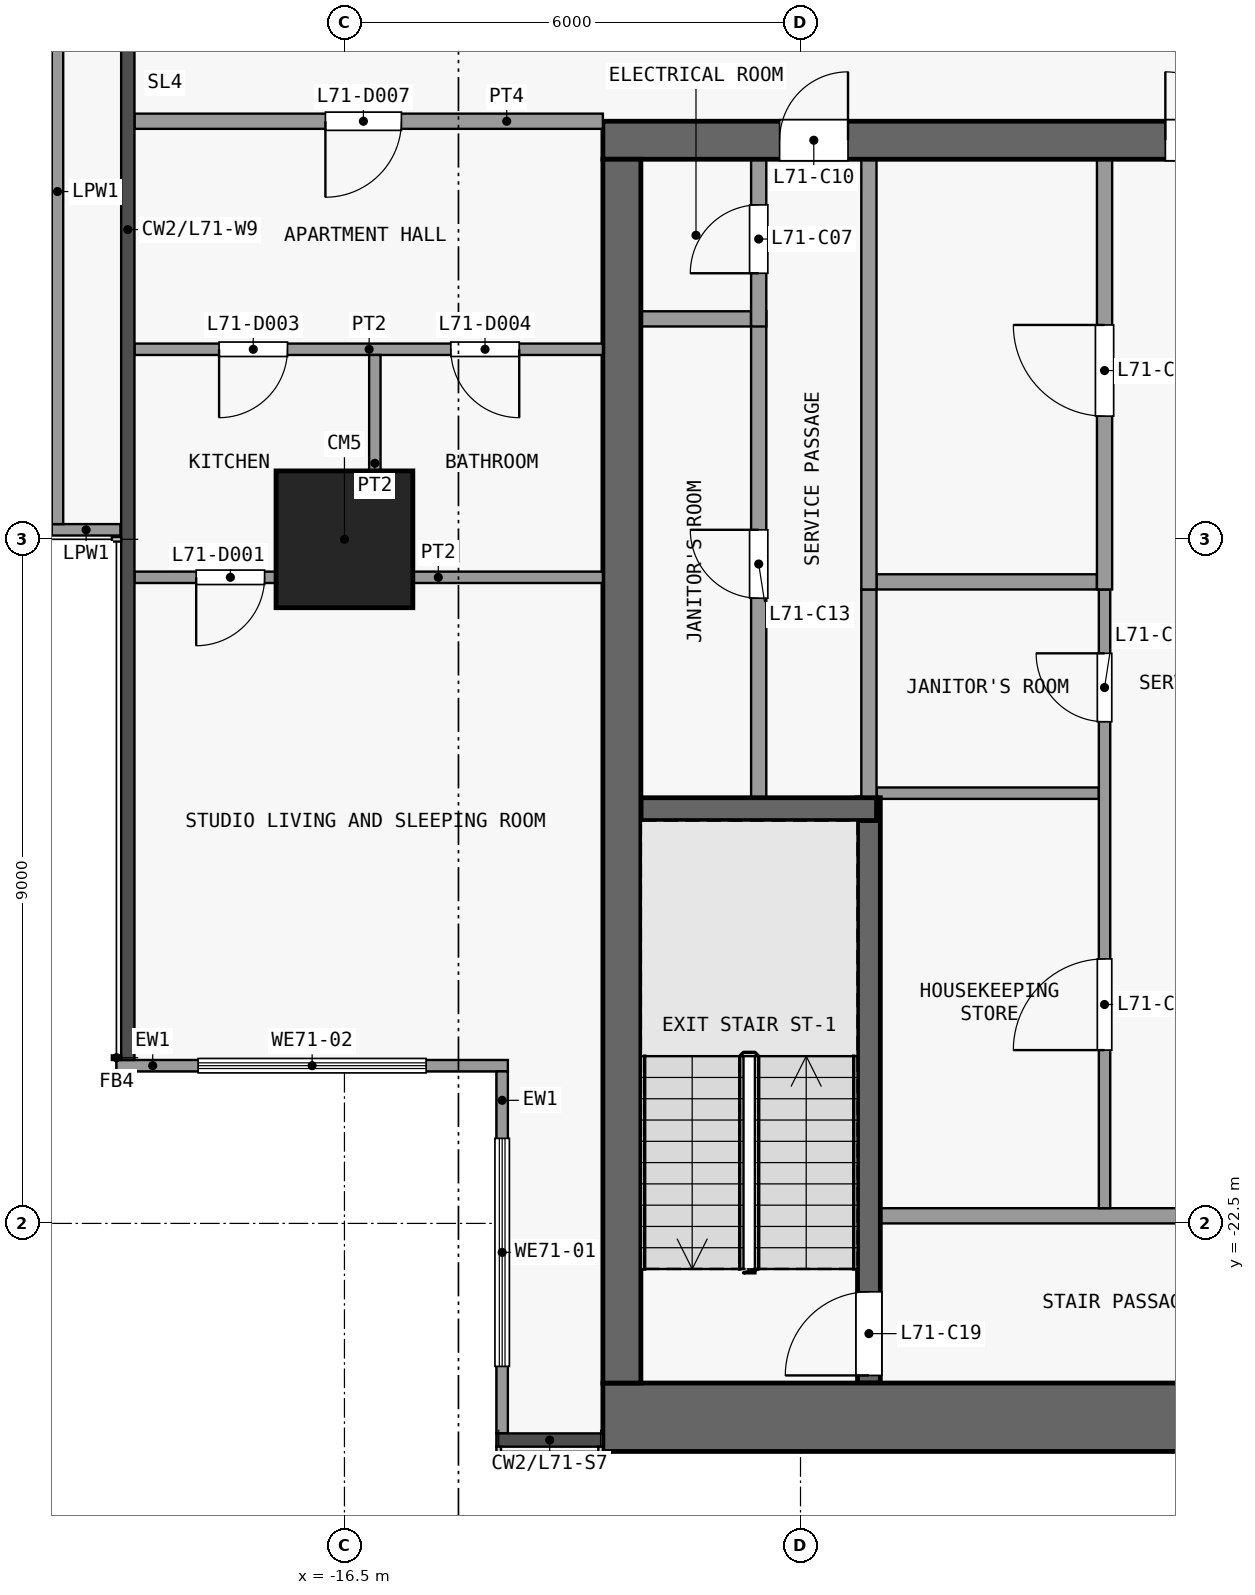
"""IFC4 building model, lengths in metres.
Left out: names, types, materials, properties, quantities, classifications, styles, units other than length and angle.
Written with IfcOpenShell. Run it as: python <this file> out.ifc"""

import sys

from ifc_helpers import new_model, si_unit, direction, frame, frame_2d, origin, origin_2d, place, context, subcontext, project, spatial, rectangle, extrude, element, fill, save


model = new_model("IFC4")
c1 = context("Model", 3, precision=1e-05, world=origin(), true_north=direction((0.0, 1.0)))
c2 = subcontext(c1, "Body", "Model", "MODEL_VIEW")
j1 = project(units=[si_unit("LENGTHUNIT", "METRE"), si_unit("PLANEANGLEUNIT", "RADIAN")], contexts=[c1])
p1 = place(None, origin())
s1 = spatial("IfcSite", under=j1, at=p1, CompositionType="ELEMENT")
p2 = place(p1, origin())
s2 = spatial("IfcBuilding", under=s1, at=p2, CompositionType="ELEMENT")
p3 = place(p2, frame((0.0, 0.0, 280.7)))
s3 = spatial("IfcBuildingStorey", under=s2, at=p3, CompositionType="ELEMENT", Elevation=280.7)
p4 = place(p3, frame((-16.5, -13.5, 0.0), z_axis=(0.0, 0.0, 1.0), x_axis=(1.0, 0.0, 0.0)))
e1 = element("IfcColumn", 1, at=p4, inside=s3, PredefinedType="COLUMN", context=c2, shape_type="SweptSolid", body=[
    extrude(rectangle(XDim=1.8, YDim=1.8, at=origin_2d()), origin(), (0.0, 0.0, 1.0), 3.6),
])
p5 = place(p3, frame((-13.1, -25.05, 0.0), z_axis=(0.0, 0.0, 1.0), x_axis=(1.0, 0.0, 0.0)))
e2 = element("IfcWall", 2, at=p5, inside=s3, PredefinedType="SHEAR", context=c2, shape_type="SweptSolid", body=[
    extrude(rectangle(XDim=26.2, YDim=0.9, at=frame_2d((13.1, 0.0))), origin(), (0.0, 0.0, 1.0), 3.3),
])
p6 = place(p3, frame((-13.1, -8.25, 0.0), z_axis=(0.0, 0.0, 1.0), x_axis=(1.0, 0.0, 0.0)))
e3 = element("IfcWall", 3, at=p6, inside=s3, PredefinedType="SHEAR", context=c2, shape_type="SweptSolid", body=[
    extrude(rectangle(XDim=26.2, YDim=0.5, at=frame_2d((13.1, 0.0))), origin(), (0.0, 0.0, 1.0), 3.3),
])
p7 = place(p6, frame((7.4, 0.0, 0.0)))
e4 = element("IfcOpeningElement", 4, at=p7, cuts=e3, PredefinedType="OPENING", context=c2, shape_type="SweptSolid", body=[
    extrude(rectangle(XDim=1.8, YDim=2.1, at=frame_2d((0.9, 1.05))), frame((0.0, 0.26, 0.0), z_axis=(0.0, -1.0, 0.0), x_axis=(1.0, 0.0, 0.0)), (0.0, 0.0, 1.0), 0.52),
])
p8 = place(p6, frame((17.0, 0.0, 0.0)))
e5 = element("IfcOpeningElement", 5, at=p8, cuts=e3, PredefinedType="OPENING", context=c2, shape_type="SweptSolid", body=[
    extrude(rectangle(XDim=1.8, YDim=2.1, at=frame_2d((0.9, 1.05))), frame((0.0, 0.26, 0.0), z_axis=(0.0, -1.0, 0.0), x_axis=(1.0, 0.0, 0.0)), (0.0, 0.0, 1.0), 0.52),
])
p9 = place(p6, frame((2.325, 0.0, 0.0)))
e6 = element("IfcOpeningElement", 6, at=p9, cuts=e3, PredefinedType="OPENING", context=c2, shape_type="SweptSolid", body=[
    extrude(rectangle(XDim=0.9, YDim=2.1, at=frame_2d((0.45, 1.05))), frame((0.0, 0.26, 0.0), z_axis=(0.0, -1.0, 0.0), x_axis=(1.0, 0.0, 0.0)), (0.0, 0.0, 1.0), 0.52),
])
p10 = place(p6, frame((22.975, 0.0, 0.0)))
e7 = element("IfcOpeningElement", 7, at=p10, cuts=e3, PredefinedType="OPENING", context=c2, shape_type="SweptSolid", body=[
    extrude(rectangle(XDim=0.9, YDim=2.1, at=frame_2d((0.45, 1.05))), frame((0.0, 0.26, 0.0), z_axis=(0.0, -1.0, 0.0), x_axis=(1.0, 0.0, 0.0)), (0.0, 0.0, 1.0), 0.52),
])
p11 = place(p3, frame((-12.85, -24.6, 0.0), z_axis=(0.0, 0.0, 1.0), x_axis=(0.0, 1.0, 0.0)))
e8 = element("IfcWall", 8, at=p11, inside=s3, PredefinedType="SHEAR", context=c2, shape_type="SweptSolid", body=[
    extrude(rectangle(XDim=16.1, YDim=0.5, at=frame_2d((8.05, 0.0))), origin(), (0.0, 0.0, 1.0), 3.3),
])
p12 = place(p3, frame((-3.25, -22.4, 0.0), z_axis=(0.0, 0.0, 1.0), x_axis=(-1.0, 0.0, 0.0)))
e9 = element("IfcWall", 9, at=p12, inside=s3, PredefinedType="PARTITIONING", context=c2, shape_type="SweptSolid", body=[
    extrude(rectangle(XDim=6.2, YDim=0.2, at=frame_2d((3.1, 0.0))), origin(), (0.0, 0.0, 1.0), 3.3),
])
p13 = place(p12, frame((0.8, 0.0, 0.0)))
e10 = element("IfcOpeningElement", 10, at=p13, cuts=e9, PredefinedType="OPENING", context=c2, shape_type="SweptSolid", body=[
    extrude(rectangle(XDim=1.5, YDim=2.1, at=frame_2d((0.75, 1.05))), frame((0.0, 0.11, 0.0), z_axis=(0.0, -1.0, 0.0), x_axis=(1.0, 0.0, 0.0)), (0.0, 0.0, 1.0), 0.22),
])
p14 = place(p3, frame((-12.6, -17.05, 0.0), z_axis=(0.0, 0.0, 1.0), x_axis=(1.0, 0.0, 0.0)))
e11 = element("IfcWall", 11, at=p14, inside=s3, PredefinedType="SHEAR", context=c2, shape_type="SweptSolid", body=[
    extrude(rectangle(XDim=3.1, YDim=0.3, at=frame_2d((1.55, 0.0))), origin(), (0.0, 0.0, 1.0), 3.3),
])
p15 = place(p3, frame((-9.5, -16.84, 0.0), z_axis=(0.0, 0.0, 1.0), x_axis=(1.0, 0.0, 0.0)))
e12 = element("IfcWall", 12, at=p15, inside=s3, PredefinedType="PARTITIONING", context=c2, shape_type="SweptSolid", body=[
    extrude(rectangle(XDim=2.925, YDim=0.15, at=frame_2d((1.462, 0.0))), origin(), (0.0, 0.0, 1.0), 3.3),
])
p16 = place(p3, frame((-9.5, -14.06, 0.0), z_axis=(0.0, 0.0, 1.0), x_axis=(1.0, 0.0, 0.0)))
e13 = element("IfcWall", 13, at=p16, inside=s3, PredefinedType="PARTITIONING", context=c2, shape_type="SweptSolid", body=[
    extrude(rectangle(XDim=2.9, YDim=0.2, at=frame_2d((1.45, 0.0))), origin(), (0.0, 0.0, 1.0), 3.3),
])
p17 = place(p3, frame((-12.6, -10.6, 0.0), z_axis=(0.0, 0.0, 1.0), x_axis=(1.0, 0.0, 0.0)))
e14 = element("IfcWall", 14, at=p17, inside=s3, PredefinedType="PARTITIONING", context=c2, shape_type="SweptSolid", body=[
    extrude(rectangle(XDim=1.45, YDim=0.2, at=frame_2d((0.725, 0.0))), origin(), (0.0, 0.0, 1.0), 3.3),
])
p18 = place(p3, frame((-11.05, -16.9, 0.0), z_axis=(0.0, 0.0, 1.0), x_axis=(0.0, 1.0, 0.0)))
e15 = element("IfcWall", 15, at=p18, inside=s3, PredefinedType="PARTITIONING", context=c2, shape_type="SweptSolid", body=[
    extrude(rectangle(XDim=6.4, YDim=0.2, at=frame_2d((3.2, 0.0))), origin(), (0.0, 0.0, 1.0), 3.3),
])
p19 = place(p18, frame((2.625, 0.0, 0.0)))
e16 = element("IfcOpeningElement", 16, at=p19, cuts=e15, PredefinedType="OPENING", context=c2, shape_type="SweptSolid", body=[
    extrude(rectangle(XDim=0.9, YDim=2.1, at=frame_2d((0.45, 1.05))), frame((0.0, 0.11, 0.0), z_axis=(0.0, -1.0, 0.0), x_axis=(1.0, 0.0, 0.0)), (0.0, 0.0, 1.0), 0.22),
])
p20 = place(p3, frame((-11.05, -10.7, 0.0), z_axis=(0.0, 0.0, 1.0), x_axis=(0.0, 1.0, 0.0)))
e17 = element("IfcWall", 17, at=p20, inside=s3, PredefinedType="PARTITIONING", context=c2, shape_type="SweptSolid", body=[
    extrude(rectangle(XDim=2.2, YDim=0.2, at=frame_2d((1.1, 0.0))), origin(), (0.0, 0.0, 1.0), 3.3),
])
p21 = place(p20, frame((0.7, 0.0, 0.0)))
e18 = element("IfcOpeningElement", 18, at=p21, cuts=e17, PredefinedType="OPENING", context=c2, shape_type="SweptSolid", body=[
    extrude(rectangle(XDim=0.9, YDim=2.1, at=frame_2d((0.45, 1.05))), frame((0.0, 0.11, 0.0), z_axis=(0.0, -1.0, 0.0), x_axis=(1.0, 0.0, 0.0)), (0.0, 0.0, 1.0), 0.22),
])
p22 = place(p3, frame((-9.6, -24.6, 0.0), z_axis=(0.0, 0.0, 1.0), x_axis=(0.0, 1.0, 0.0)))
e19 = element("IfcWall", 19, at=p22, inside=s3, PredefinedType="SHEAR", context=c2, shape_type="SweptSolid", body=[
    extrude(rectangle(XDim=7.7, YDim=0.3, at=frame_2d((3.85, 0.0))), origin(), (0.0, 0.0, 1.0), 3.3),
])
p23 = place(p22, frame((0.1, 0.0, 0.0)))
e20 = element("IfcOpeningElement", 20, at=p23, cuts=e19, PredefinedType="OPENING", context=c2, shape_type="SweptSolid", body=[
    extrude(rectangle(XDim=1.1, YDim=2.1, at=frame_2d((0.55, 1.05))), frame((0.0, 0.16, 0.0), z_axis=(0.0, -1.0, 0.0), x_axis=(1.0, 0.0, 0.0)), (0.0, 0.0, 1.0), 0.32),
])
p24 = place(p3, frame((-9.6, -16.9, 0.0), z_axis=(0.0, 0.0, 1.0), x_axis=(0.0, 1.0, 0.0)))
e21 = element("IfcWall", 21, at=p24, inside=s3, PredefinedType="PARTITIONING", context=c2, shape_type="SweptSolid", body=[
    extrude(rectangle(XDim=2.74, YDim=0.2, at=frame_2d((1.37, 0.0))), origin(), (0.0, 0.0, 1.0), 3.3),
])
p25 = place(p3, frame((-9.6, -14.16, 0.0), z_axis=(0.0, 0.0, 1.0), x_axis=(0.0, 1.0, 0.0)))
e22 = element("IfcWall", 22, at=p25, inside=s3, PredefinedType="PARTITIONING", context=c2, shape_type="SweptSolid", body=[
    extrude(rectangle(XDim=5.66, YDim=0.2, at=frame_2d((2.83, 0.0))), origin(), (0.0, 0.0, 1.0), 3.3),
])
p26 = place(p3, frame((-6.5, -22.3, 0.0), z_axis=(0.0, 0.0, 1.0), x_axis=(0.0, 1.0, 0.0)))
e23 = element("IfcWall", 23, at=p26, inside=s3, PredefinedType="PARTITIONING", context=c2, shape_type="SweptSolid", body=[
    extrude(rectangle(XDim=8.14, YDim=0.15, at=frame_2d((4.07, 0.0))), origin(), (0.0, 0.0, 1.0), 3.3),
])
p27 = place(p26, frame((2.08, 0.0, 0.0)))
e24 = element("IfcOpeningElement", 24, at=p27, cuts=e23, PredefinedType="OPENING", context=c2, shape_type="SweptSolid", body=[
    extrude(rectangle(XDim=1.2, YDim=2.1, at=frame_2d((0.6, 1.05))), frame((0.0, 0.085, 0.0), z_axis=(0.0, -1.0, 0.0), x_axis=(1.0, 0.0, 0.0)), (0.0, 0.0, 1.0), 0.17),
])
p28 = place(p26, frame((6.4, 0.0, 0.0)))
e25 = element("IfcOpeningElement", 25, at=p28, cuts=e23, PredefinedType="OPENING", context=c2, shape_type="SweptSolid", body=[
    extrude(rectangle(XDim=0.9, YDim=2.1, at=frame_2d((0.45, 1.05))), frame((0.0, 0.085, 0.0), z_axis=(0.0, -1.0, 0.0), x_axis=(1.0, 0.0, 0.0)), (0.0, 0.0, 1.0), 0.17),
])
p29 = place(p3, frame((-6.5, -14.16, 0.0), z_axis=(0.0, 0.0, 1.0), x_axis=(0.0, 1.0, 0.0)))
e26 = element("IfcWall", 26, at=p29, inside=s3, PredefinedType="PARTITIONING", context=c2, shape_type="SweptSolid", body=[
    extrude(rectangle(XDim=5.66, YDim=0.2, at=frame_2d((2.83, 0.0))), origin(), (0.0, 0.0, 1.0), 3.3),
])
p30 = place(p29, frame((2.28, 0.0, 0.0)))
e27 = element("IfcOpeningElement", 27, at=p30, cuts=e26, PredefinedType="OPENING", context=c2, shape_type="SweptSolid", body=[
    extrude(rectangle(XDim=1.2, YDim=2.1, at=frame_2d((0.6, 1.05))), frame((0.0, 0.11, 0.0), z_axis=(0.0, -1.0, 0.0), x_axis=(1.0, 0.0, 0.0)), (0.0, 0.0, 1.0), 0.22),
])
p31 = place(p3, frame((-14.425, -25.262, 0.0), z_axis=(0.0, 0.0, 1.0), x_axis=(0.0, 1.0, 0.0)))
e28 = element("IfcWall", 28, at=p31, inside=s3, PredefinedType="SOLIDWALL", context=c2, shape_type="SweptSolid", body=[
    extrude(rectangle(XDim=4.762, YDim=0.15, at=frame_2d((2.381, 0.0))), origin(), (0.0, 0.0, 1.0), 3.3),
])
p32 = place(p31, frame((0.881, 0.0, 0.9)))
e29 = element("IfcOpeningElement", 29, at=p32, cuts=e28, PredefinedType="OPENING", context=c2, shape_type="SweptSolid", body=[
    extrude(rectangle(XDim=3.0, YDim=2.4, at=frame_2d((1.5, 1.2))), frame((0.0, 0.085, 0.0), z_axis=(0.0, -1.0, 0.0), x_axis=(1.0, 0.0, 0.0)), (0.0, 0.0, 1.0), 0.17),
])
p33 = place(p3, frame((-14.35, -20.425, 0.0), z_axis=(0.0, 0.0, 1.0), x_axis=(-1.0, 0.0, 0.0)))
e30 = element("IfcWall", 30, at=p33, inside=s3, PredefinedType="SOLIDWALL", context=c2, shape_type="SweptSolid", body=[
    extrude(rectangle(XDim=5.15, YDim=0.15, at=frame_2d((2.575, 0.0))), origin(), (0.0, 0.0, 1.0), 3.3),
])
p34 = place(p33, frame((1.075, 0.0, 0.9)))
e31 = element("IfcOpeningElement", 31, at=p34, cuts=e30, PredefinedType="OPENING", context=c2, shape_type="SweptSolid", body=[
    extrude(rectangle(XDim=3.0, YDim=2.4, at=frame_2d((1.5, 1.2))), frame((0.0, 0.085, 0.0), z_axis=(0.0, -1.0, 0.0), x_axis=(1.0, 0.0, 0.0)), (0.0, 0.0, 1.0), 0.17),
])
p35 = place(p3, frame((-19.448, -13.375, 0.0), z_axis=(0.0, 0.0, 1.0), x_axis=(-1.0, 0.0, 0.0)))
e32 = element("IfcWall", 32, at=p35, inside=s3, PredefinedType="PARAPET", context=c2, shape_type="SweptSolid", body=[
    extrude(rectangle(XDim=0.903, YDim=0.15, at=frame_2d((0.451, 0.0))), origin(), (0.0, 0.0, 1.0), 1.15),
])
p36 = place(p3, frame((-20.275, -13.3, 0.0), z_axis=(0.0, 0.0, 1.0), x_axis=(0.0, 1.0, 0.0)))
e33 = element("IfcWall", 33, at=p36, inside=s3, PredefinedType="PARAPET", context=c2, shape_type="SweptSolid", body=[
    extrude(rectangle(XDim=8.75, YDim=0.15, at=frame_2d((4.375, 0.0))), origin(), (0.0, 0.0, 1.0), 1.15),
])
p37 = place(p3, frame((-19.262, -14.0, 0.0), z_axis=(0.0, 0.0, 1.0), x_axis=(1.0, 0.0, 0.0)))
e34 = element("IfcWall", 34, at=p37, inside=s3, PredefinedType="PARTITIONING", context=c2, shape_type="SweptSolid", body=[
    extrude(rectangle(XDim=6.162, YDim=0.15, at=frame_2d((3.081, 0.0))), origin(), (0.0, 0.0, 1.0), 3.3),
])
p38 = place(p37, frame((0.812, 0.0, 0.0)))
e35 = element("IfcOpeningElement", 35, at=p38, cuts=e34, PredefinedType="OPENING", context=c2, shape_type="SweptSolid", body=[
    extrude(rectangle(XDim=0.9, YDim=2.1, at=frame_2d((0.45, 1.05))), frame((0.0, 0.085, 0.0), z_axis=(0.0, -1.0, 0.0), x_axis=(1.0, 0.0, 0.0)), (0.0, 0.0, 1.0), 0.17),
])
p39 = place(p3, frame((-19.262, -11.0, 0.0), z_axis=(0.0, 0.0, 1.0), x_axis=(1.0, 0.0, 0.0)))
e36 = element("IfcWall", 36, at=p39, inside=s3, PredefinedType="PARTITIONING", context=c2, shape_type="SweptSolid", body=[
    extrude(rectangle(XDim=6.162, YDim=0.15, at=frame_2d((3.081, 0.0))), origin(), (0.0, 0.0, 1.0), 3.3),
])
p40 = place(p39, frame((1.113, 0.0, 0.0)))
e37 = element("IfcOpeningElement", 37, at=p40, cuts=e36, PredefinedType="OPENING", context=c2, shape_type="SweptSolid", body=[
    extrude(rectangle(XDim=0.9, YDim=2.1, at=frame_2d((0.45, 1.05))), frame((0.0, 0.085, 0.0), z_axis=(0.0, -1.0, 0.0), x_axis=(1.0, 0.0, 0.0)), (0.0, 0.0, 1.0), 0.17),
])
p41 = place(p39, frame((4.162, 0.0, 0.0)))
e38 = element("IfcOpeningElement", 38, at=p41, cuts=e36, PredefinedType="OPENING", context=c2, shape_type="SweptSolid", body=[
    extrude(rectangle(XDim=0.9, YDim=2.1, at=frame_2d((0.45, 1.05))), frame((0.0, 0.085, 0.0), z_axis=(0.0, -1.0, 0.0), x_axis=(1.0, 0.0, 0.0)), (0.0, 0.0, 1.0), 0.17),
])
p42 = place(p3, frame((-19.262, -8.0, 0.0), z_axis=(0.0, 0.0, 1.0), x_axis=(1.0, 0.0, 0.0)))
e39 = element("IfcWall", 39, at=p42, inside=s3, PredefinedType="PARTITIONING", context=c2, shape_type="SweptSolid", body=[
    extrude(rectangle(XDim=6.162, YDim=0.2, at=frame_2d((3.081, 0.0))), origin(), (0.0, 0.0, 1.0), 3.3),
])
p43 = place(p42, frame((2.512, 0.0, 0.0)))
e40 = element("IfcOpeningElement", 40, at=p43, cuts=e39, PredefinedType="OPENING", context=c2, shape_type="SweptSolid", body=[
    extrude(rectangle(XDim=1.0, YDim=2.1, at=frame_2d((0.5, 1.05))), frame((0.0, 0.11, 0.0), z_axis=(0.0, -1.0, 0.0), x_axis=(1.0, 0.0, 0.0)), (0.0, 0.0, 1.0), 0.22),
])
p44 = place(p3, frame((-16.1, -13.925, 0.0), z_axis=(0.0, 0.0, 1.0), x_axis=(0.0, 1.0, 0.0)))
e41 = element("IfcWall", 41, at=p44, inside=s3, PredefinedType="PARTITIONING", context=c2, shape_type="SweptSolid", body=[
    extrude(rectangle(XDim=2.85, YDim=0.15, at=frame_2d((1.425, 0.0))), origin(), (0.0, 0.0, 1.0), 3.3),
])
p45 = place(p7, origin())
e42 = element("IfcDoor", 42, at=p45, inside=s3, OperationType="DOUBLE_DOOR_SINGLE_SWING", PredefinedType="DOOR", context=c2, shape_type="SweptSolid", body=[
    extrude(rectangle(XDim=1.8, YDim=2.1, at=frame_2d((0.9, 1.05))), frame((0.0, 0.025, 0.0), z_axis=(0.0, -1.0, 0.0), x_axis=(1.0, 0.0, 0.0)), (0.0, 0.0, 1.0), 0.05),
])
fill(e4, e42)
p46 = place(p21, origin())
e43 = element("IfcDoor", 43, at=p46, inside=s3, OperationType="SINGLE_SWING_LEFT", PredefinedType="DOOR", context=c2, shape_type="SweptSolid", body=[
    extrude(rectangle(XDim=0.9, YDim=2.1, at=frame_2d((0.45, 1.05))), frame((0.0, 0.025, 0.0), z_axis=(0.0, -1.0, 0.0), x_axis=(1.0, 0.0, 0.0)), (0.0, 0.0, 1.0), 0.05),
])
fill(e18, e43)
p47 = place(p30, origin())
e44 = element("IfcDoor", 44, at=p47, inside=s3, OperationType="SINGLE_SWING_RIGHT", PredefinedType="DOOR", context=c2, shape_type="SweptSolid", body=[
    extrude(rectangle(XDim=1.2, YDim=2.1, at=frame_2d((0.6, 1.05))), frame((0.0, 0.025, 0.0), z_axis=(0.0, -1.0, 0.0), x_axis=(1.0, 0.0, 0.0)), (0.0, 0.0, 1.0), 0.05),
])
fill(e27, e44)
p48 = place(p9, origin())
e45 = element("IfcDoor", 45, at=p48, inside=s3, OperationType="SINGLE_SWING_RIGHT", PredefinedType="DOOR", context=c2, shape_type="SweptSolid", body=[
    extrude(rectangle(XDim=0.9, YDim=2.1, at=frame_2d((0.45, 1.05))), frame((0.0, 0.025, 0.0), z_axis=(0.0, -1.0, 0.0), x_axis=(1.0, 0.0, 0.0)), (0.0, 0.0, 1.0), 0.05),
])
fill(e6, e45)
p49 = place(p19, origin())
e46 = element("IfcDoor", 46, at=p49, inside=s3, OperationType="SINGLE_SWING_RIGHT", PredefinedType="DOOR", context=c2, shape_type="SweptSolid", body=[
    extrude(rectangle(XDim=0.9, YDim=2.1, at=frame_2d((0.45, 1.05))), frame((0.0, 0.025, 0.0), z_axis=(0.0, -1.0, 0.0), x_axis=(1.0, 0.0, 0.0)), (0.0, 0.0, 1.0), 0.05),
])
fill(e16, e46)
p50 = place(p27, origin())
e47 = element("IfcDoor", 47, at=p50, inside=s3, OperationType="SINGLE_SWING_LEFT", PredefinedType="DOOR", context=c2, shape_type="SweptSolid", body=[
    extrude(rectangle(XDim=1.2, YDim=2.1, at=frame_2d((0.6, 1.05))), frame((0.0, 0.025, 0.0), z_axis=(0.0, -1.0, 0.0), x_axis=(1.0, 0.0, 0.0)), (0.0, 0.0, 1.0), 0.05),
])
fill(e24, e47)
p51 = place(p28, origin())
e48 = element("IfcDoor", 48, at=p51, inside=s3, OperationType="SINGLE_SWING_RIGHT", PredefinedType="DOOR", context=c2, shape_type="SweptSolid", body=[
    extrude(rectangle(XDim=0.9, YDim=2.1, at=frame_2d((0.45, 1.05))), frame((0.0, 0.025, 0.0), z_axis=(0.0, -1.0, 0.0), x_axis=(1.0, 0.0, 0.0)), (0.0, 0.0, 1.0), 0.05),
])
fill(e25, e48)
p52 = place(p23, origin())
e49 = element("IfcDoor", 49, at=p52, inside=s3, OperationType="SINGLE_SWING_LEFT", PredefinedType="DOOR", context=c2, shape_type="SweptSolid", body=[
    extrude(rectangle(XDim=1.1, YDim=2.1, at=frame_2d((0.55, 1.05))), frame((0.0, 0.025, 0.0), z_axis=(0.0, -1.0, 0.0), x_axis=(1.0, 0.0, 0.0)), (0.0, 0.0, 1.0), 0.05),
])
fill(e20, e49)
p53 = place(p32, origin())
e50 = element("IfcWindow", 50, at=p53, inside=s3, PartitioningType="SINGLE_PANEL", PredefinedType="WINDOW", context=c2, shape_type="SweptSolid", body=[
    extrude(rectangle(XDim=3.0, YDim=2.4, at=frame_2d((1.5, 1.2))), frame((0.0, 0.03, 0.0), z_axis=(0.0, -1.0, 0.0), x_axis=(1.0, 0.0, 0.0)), (0.0, 0.0, 1.0), 0.06),
])
fill(e29, e50)
p54 = place(p34, origin())
e51 = element("IfcWindow", 51, at=p54, inside=s3, PartitioningType="SINGLE_PANEL", PredefinedType="WINDOW", context=c2, shape_type="SweptSolid", body=[
    extrude(rectangle(XDim=3.0, YDim=2.4, at=frame_2d((1.5, 1.2))), frame((0.0, 0.03, 0.0), z_axis=(0.0, -1.0, 0.0), x_axis=(1.0, 0.0, 0.0)), (0.0, 0.0, 1.0), 0.06),
])
fill(e31, e51)
p55 = place(p38, origin())
e52 = element("IfcDoor", 52, at=p55, inside=s3, OperationType="SINGLE_SWING_LEFT", PredefinedType="DOOR", context=c2, shape_type="SweptSolid", body=[
    extrude(rectangle(XDim=0.9, YDim=2.1, at=frame_2d((0.45, 1.05))), frame((0.0, 0.025, 0.0), z_axis=(0.0, -1.0, 0.0), x_axis=(1.0, 0.0, 0.0)), (0.0, 0.0, 1.0), 0.05),
])
fill(e35, e52)
p56 = place(p40, origin())
e53 = element("IfcDoor", 53, at=p56, inside=s3, OperationType="SINGLE_SWING_LEFT", PredefinedType="DOOR", context=c2, shape_type="SweptSolid", body=[
    extrude(rectangle(XDim=0.9, YDim=2.1, at=frame_2d((0.45, 1.05))), frame((0.0, 0.025, 0.0), z_axis=(0.0, -1.0, 0.0), x_axis=(1.0, 0.0, 0.0)), (0.0, 0.0, 1.0), 0.05),
])
fill(e37, e53)
p57 = place(p41, origin())
e54 = element("IfcDoor", 54, at=p57, inside=s3, OperationType="SINGLE_SWING_RIGHT", PredefinedType="DOOR", context=c2, shape_type="SweptSolid", body=[
    extrude(rectangle(XDim=0.9, YDim=2.1, at=frame_2d((0.45, 1.05))), frame((0.0, 0.025, 0.0), z_axis=(0.0, -1.0, 0.0), x_axis=(1.0, 0.0, 0.0)), (0.0, 0.0, 1.0), 0.05),
])
fill(e38, e54)
p58 = place(p43, origin())
e55 = element("IfcDoor", 55, at=p58, inside=s3, OperationType="SINGLE_SWING_LEFT", PredefinedType="DOOR", context=c2, shape_type="SweptSolid", body=[
    extrude(rectangle(XDim=1.0, YDim=2.1, at=frame_2d((0.5, 1.05))), frame((0.0, 0.025, 0.0), z_axis=(0.0, -1.0, 0.0), x_axis=(1.0, 0.0, 0.0)), (0.0, 0.0, 1.0), 0.05),
])
fill(e40, e55)
save(model, sys.argv[1])
